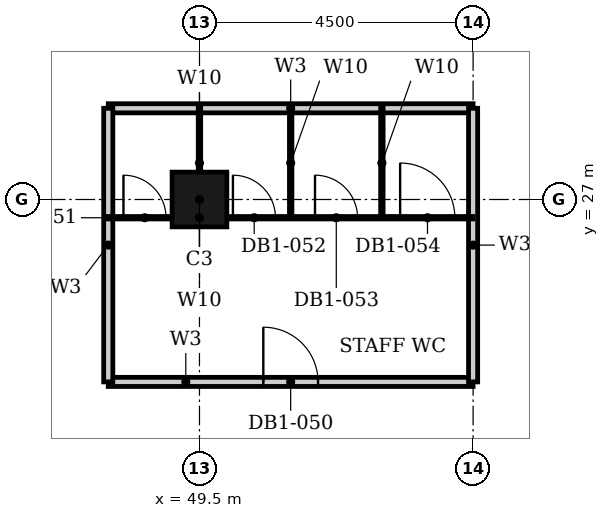
"""IFC4 building model, lengths in metres.
Left out: names, types, materials, properties, quantities, classifications, styles, units other than length and angle.
Written with IfcOpenShell. Run it as: python <this file> out.ifc"""

import sys

from ifc_helpers import new_model, si_unit, direction, frame, frame_2d, origin, origin_2d, place, context, subcontext, project, spatial, rectangle, hollow_rectangle, extrude, element, fill, save


model = new_model("IFC4")
c1 = context("Model", 3, precision=1e-05, world=origin(), true_north=direction((0.0, 1.0)))
c2 = subcontext(c1, "Body", "Model", "MODEL_VIEW")
j1 = project(units=[si_unit("LENGTHUNIT", "METRE"), si_unit("PLANEANGLEUNIT", "RADIAN")], contexts=[c1])
p1 = place(None, origin())
s1 = spatial("IfcSite", under=j1, at=p1, CompositionType="ELEMENT")
p2 = place(p1, origin())
s2 = spatial("IfcBuilding", under=s1, at=p2, CompositionType="ELEMENT")
p3 = place(p2, frame((0.0, 0.0, -6.0)))
s3 = spatial("IfcBuildingStorey", under=s2, at=p3, CompositionType="ELEMENT", Elevation=-6.0)
p4 = place(p3, frame((49.5, 27.0, -0.5), z_axis=(0.0, 0.0, 1.0), x_axis=(1.0, 0.0, 0.0)))
e1 = element("IfcColumn", 1, at=p4, inside=s3, PredefinedType="COLUMN", context=c2, shape_type="SweptSolid", body=[
    extrude(hollow_rectangle(XDim=0.9, YDim=0.9, WallThickness=0.028, at=origin_2d()), origin(), (0.0, 0.0, 1.0), 6.5),
])
p5 = place(p3, frame((48.0, 24.0, 0.0), z_axis=(0.0, 0.0, 1.0), x_axis=(1.0, 0.0, 0.0)))
e2 = element("IfcWall", 2, at=p5, inside=s3, PredefinedType="PARTITIONING", context=c2, shape_type="SweptSolid", body=[
    extrude(rectangle(XDim=6.0, YDim=0.15, at=frame_2d((3.0, 0.0))), origin(), (0.0, 0.0, 1.0), 5.6),
])
p6 = place(p5, frame((2.55, 0.0, 0.0)))
e3 = element("IfcOpeningElement", 3, at=p6, cuts=e2, PredefinedType="OPENING", context=c2, shape_type="SweptSolid", body=[
    extrude(rectangle(XDim=0.9, YDim=2.1, at=frame_2d((0.45, 1.05))), frame((0.0, 0.085, 0.0), z_axis=(0.0, -1.0, 0.0), x_axis=(1.0, 0.0, 0.0)), (0.0, 0.0, 1.0), 0.17),
])
p7 = place(p3, frame((48.0, 28.5, 0.0), z_axis=(0.0, 0.0, 1.0), x_axis=(1.0, 0.0, 0.0)))
e4 = element("IfcWall", 4, at=p7, inside=s3, PredefinedType="PARTITIONING", context=c2, shape_type="SweptSolid", body=[
    extrude(rectangle(XDim=6.0, YDim=0.15, at=frame_2d((3.0, 0.0))), origin(), (0.0, 0.0, 1.0), 5.6),
])
for number, where, z_axis, x_axis in (
    (5, (48.0, 24.0, 0.0), (0.0, 0.0, 1.0), (0.0, 1.0, 0.0)),
    (6, (54.0, 24.0, 0.0), (0.0, 0.0, 1.0), (0.0, 1.0, 0.0)),
):
    element("IfcWall", number, at=place(p3, frame(where, z_axis=z_axis, x_axis=x_axis)), inside=s3, PredefinedType="PARTITIONING", context=c2, shape_type="SweptSolid", body=[
        extrude(rectangle(XDim=4.5, YDim=0.15, at=frame_2d((2.25, 0.0))), origin(), (0.0, 0.0, 1.0), 5.6),
    ])
for number, where, z_axis, x_axis in (
    (7, (49.5, 28.5, 0.0), (0.0, 0.0, 1.0), (0.0, -1.0, 0.0)),
    (8, (51.0, 28.5, 0.0), (0.0, 0.0, 1.0), (0.0, -1.0, 0.0)),
    (9, (52.5, 28.5, 0.0), (0.0, 0.0, 1.0), (0.0, -1.0, 0.0)),
):
    element("IfcWall", number, at=place(p3, frame(where, z_axis=z_axis, x_axis=x_axis)), inside=s3, PredefinedType="PARTITIONING", context=c2, shape_type="SweptSolid", body=[
        extrude(rectangle(XDim=1.8, YDim=0.04, at=frame_2d((0.9, 0.0))), origin(), (0.0, 0.0, 1.0), 5.6),
    ])
p8 = place(p3, frame((48.0, 26.7, 0.0), z_axis=(0.0, 0.0, 1.0), x_axis=(1.0, 0.0, 0.0)))
e10 = element("IfcWall", 10, at=p8, inside=s3, PredefinedType="PARTITIONING", context=c2, shape_type="SweptSolid", body=[
    extrude(rectangle(XDim=6.0, YDim=0.04, at=frame_2d((3.0, 0.0))), origin(), (0.0, 0.0, 1.0), 5.6),
])
p9 = place(p8, frame((0.25, 0.0, 0.0)))
e11 = element("IfcOpeningElement", 11, at=p9, cuts=e10, PredefinedType="OPENING", context=c2, shape_type="SweptSolid", body=[
    extrude(rectangle(XDim=0.7, YDim=2.0, at=frame_2d((0.35, 1.0))), frame((0.0, 0.03, 0.0), z_axis=(0.0, -1.0, 0.0), x_axis=(1.0, 0.0, 0.0)), (0.0, 0.0, 1.0), 0.06),
])
p10 = place(p8, frame((2.05, 0.0, 0.0)))
e12 = element("IfcOpeningElement", 12, at=p10, cuts=e10, PredefinedType="OPENING", context=c2, shape_type="SweptSolid", body=[
    extrude(rectangle(XDim=0.7, YDim=2.0, at=frame_2d((0.35, 1.0))), frame((0.0, 0.03, 0.0), z_axis=(0.0, -1.0, 0.0), x_axis=(1.0, 0.0, 0.0)), (0.0, 0.0, 1.0), 0.06),
])
p11 = place(p8, frame((3.4, 0.0, 0.0)))
e13 = element("IfcOpeningElement", 13, at=p11, cuts=e10, PredefinedType="OPENING", context=c2, shape_type="SweptSolid", body=[
    extrude(rectangle(XDim=0.7, YDim=2.0, at=frame_2d((0.35, 1.0))), frame((0.0, 0.03, 0.0), z_axis=(0.0, -1.0, 0.0), x_axis=(1.0, 0.0, 0.0)), (0.0, 0.0, 1.0), 0.06),
])
p12 = place(p8, frame((4.8, 0.0, 0.0)))
e14 = element("IfcOpeningElement", 14, at=p12, cuts=e10, PredefinedType="OPENING", context=c2, shape_type="SweptSolid", body=[
    extrude(rectangle(XDim=0.9, YDim=2.0, at=frame_2d((0.45, 1.0))), frame((0.0, 0.03, 0.0), z_axis=(0.0, -1.0, 0.0), x_axis=(1.0, 0.0, 0.0)), (0.0, 0.0, 1.0), 0.06),
])
p13 = place(p6, origin())
e15 = element("IfcDoor", 15, at=p13, inside=s3, OperationType="SINGLE_SWING_LEFT", PredefinedType="DOOR", context=c2, shape_type="SweptSolid", body=[
    extrude(rectangle(XDim=0.9, YDim=2.1, at=frame_2d((0.45, 1.05))), frame((0.0, 0.025, 0.0), z_axis=(0.0, -1.0, 0.0), x_axis=(1.0, 0.0, 0.0)), (0.0, 0.0, 1.0), 0.05),
])
fill(e3, e15)
p14 = place(p9, origin())
e16 = element("IfcDoor", 16, at=p14, inside=s3, OperationType="SINGLE_SWING_LEFT", PredefinedType="DOOR", context=c2, shape_type="SweptSolid", body=[
    extrude(rectangle(XDim=0.7, YDim=2.0, at=frame_2d((0.35, 1.0))), frame((0.0, 0.02, 0.0), z_axis=(0.0, -1.0, 0.0), x_axis=(1.0, 0.0, 0.0)), (0.0, 0.0, 1.0), 0.04),
])
fill(e11, e16)
p15 = place(p10, origin())
e17 = element("IfcDoor", 17, at=p15, inside=s3, OperationType="SINGLE_SWING_LEFT", PredefinedType="DOOR", context=c2, shape_type="SweptSolid", body=[
    extrude(rectangle(XDim=0.7, YDim=2.0, at=frame_2d((0.35, 1.0))), frame((0.0, 0.02, 0.0), z_axis=(0.0, -1.0, 0.0), x_axis=(1.0, 0.0, 0.0)), (0.0, 0.0, 1.0), 0.04),
])
fill(e12, e17)
p16 = place(p11, origin())
e18 = element("IfcDoor", 18, at=p16, inside=s3, OperationType="SINGLE_SWING_RIGHT", PredefinedType="DOOR", context=c2, shape_type="SweptSolid", body=[
    extrude(rectangle(XDim=0.7, YDim=2.0, at=frame_2d((0.35, 1.0))), frame((0.0, 0.02, 0.0), z_axis=(0.0, -1.0, 0.0), x_axis=(1.0, 0.0, 0.0)), (0.0, 0.0, 1.0), 0.04),
])
fill(e13, e18)
p17 = place(p12, origin())
e19 = element("IfcDoor", 19, at=p17, inside=s3, OperationType="SINGLE_SWING_RIGHT", PredefinedType="DOOR", context=c2, shape_type="SweptSolid", body=[
    extrude(rectangle(XDim=0.9, YDim=2.0, at=frame_2d((0.45, 1.0))), frame((0.0, 0.02, 0.0), z_axis=(0.0, -1.0, 0.0), x_axis=(1.0, 0.0, 0.0)), (0.0, 0.0, 1.0), 0.04),
])
fill(e14, e19)
save(model, sys.argv[1])
